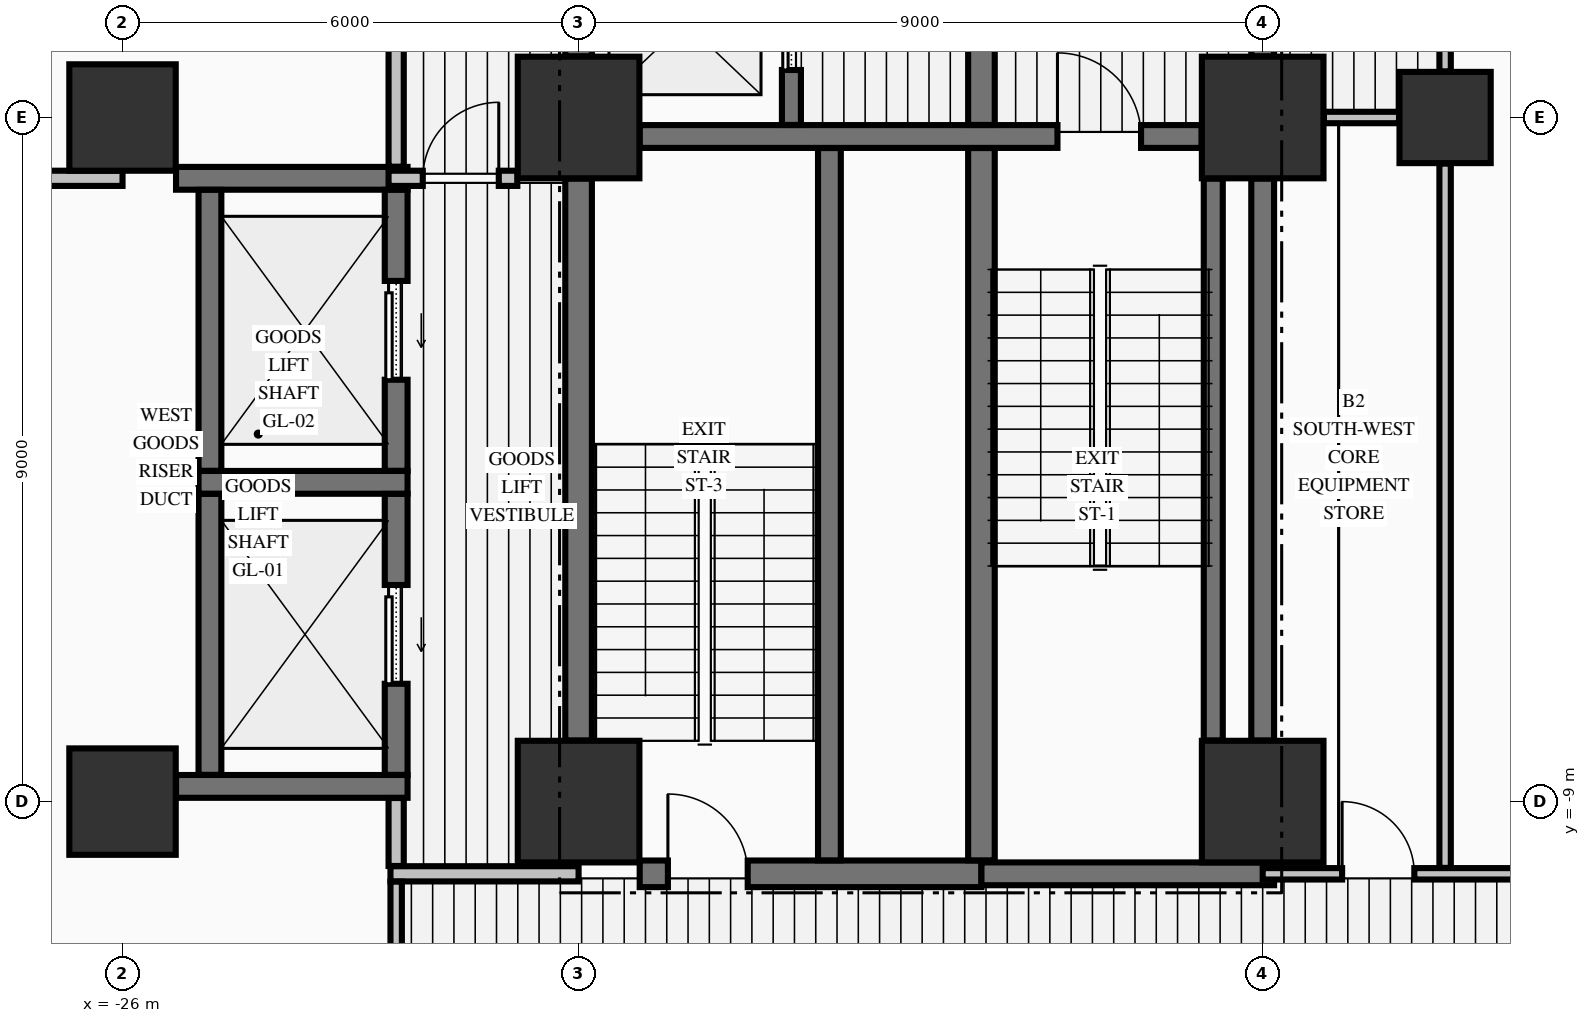
"""IFC4 building model, lengths in metres.
Left out: names, types, materials, properties, quantities, classifications, styles, units other than length and angle.
Written with IfcOpenShell. Run it as: python <this file> out.ifc"""

import sys

from ifc_helpers import new_model, si_unit, direction, frame, frame_2d, origin, origin_2d, place, context, subcontext, project, spatial, rectangle, extrude, element, fill, save


model = new_model("IFC4")
c1 = context("Model", 3, precision=1e-05, world=origin(), true_north=direction((0.0, 1.0)))
c2 = subcontext(c1, "Body", "Model", "MODEL_VIEW")
j1 = project(units=[si_unit("LENGTHUNIT", "METRE"), si_unit("PLANEANGLEUNIT", "RADIAN")], contexts=[c1])
p1 = place(None, origin())
s1 = spatial("IfcSite", under=j1, at=p1, CompositionType="ELEMENT")
p2 = place(p1, origin())
s2 = spatial("IfcBuilding", under=s1, at=p2, CompositionType="ELEMENT")
p3 = place(p2, frame((0.0, 0.0, -9.1)))
s3 = spatial("IfcBuildingStorey", under=s2, at=p3, CompositionType="ELEMENT", Elevation=-9.1)
for number, where, z_axis, x_axis in (
    (1, (-26.0, -9.0, -0.45), (0.0, 0.0, 1.0), (1.0, 0.0, 0.0)),
    (2, (-26.0, 0.0, -0.45), (0.0, 0.0, 1.0), (1.0, 0.0, 0.0)),
):
    element("IfcColumn", number, at=place(p3, frame(where, z_axis=z_axis, x_axis=x_axis)), inside=s3, PredefinedType="COLUMN", context=c2, shape_type="SweptSolid", body=[
        extrude(rectangle(XDim=1.4, YDim=1.4, at=origin_2d()), origin(), (0.0, 0.0, 1.0), 4.65),
    ])
for number, where, z_axis, x_axis in (
    (3, (-20.0, -9.0, -0.45), (0.0, 0.0, 1.0), (1.0, 0.0, 0.0)),
    (4, (-20.0, 0.0, -0.45), (0.0, 0.0, 1.0), (1.0, 0.0, 0.0)),
    (5, (-11.0, -9.0, -0.45), (0.0, 0.0, 1.0), (1.0, 0.0, 0.0)),
    (6, (-11.0, 0.0, -0.45), (0.0, 0.0, 1.0), (1.0, 0.0, 0.0)),
):
    element("IfcColumn", number, at=place(p3, frame(where, z_axis=z_axis, x_axis=x_axis)), inside=s3, PredefinedType="COLUMN", context=c2, shape_type="SweptSolid", body=[
        extrude(rectangle(XDim=1.6, YDim=1.6, at=origin_2d()), origin(), (0.0, 0.0, 1.0), 4.65),
    ])
p4 = place(p3, frame((-8.6, 0.0, -0.45), z_axis=(0.0, 0.0, 1.0), x_axis=(1.0, 0.0, 0.0)))
e7 = element("IfcColumn", 7, at=p4, inside=s3, PredefinedType="COLUMN", context=c2, shape_type="SweptSolid", body=[
    extrude(rectangle(XDim=1.2, YDim=1.2, at=origin_2d()), origin(), (0.0, 0.0, 1.0), 4.65),
])
p5 = place(p3, frame((-19.196, -9.95, 0.0), z_axis=(0.0, 0.0, 1.0), x_axis=(1.0, 0.0, 0.0)))
e8 = element("IfcWall", 8, at=p5, inside=s3, PredefinedType="SHEAR", context=c2, shape_type="SweptSolid", body=[
    extrude(rectangle(XDim=4.496, YDim=0.35, at=frame_2d((2.248, 0.0))), origin(), (0.0, 0.0, 1.0), 4.2),
])
p6 = place(p5, frame((0.371, 0.0, 0.0)))
e9 = element("IfcOpeningElement", 9, at=p6, cuts=e8, PredefinedType="OPENING", context=c2, shape_type="SweptSolid", body=[
    extrude(rectangle(XDim=1.05, YDim=2.15, at=frame_2d((0.525, 1.075))), frame((0.0, 0.185, 0.0), z_axis=(0.0, -1.0, 0.0), x_axis=(1.0, 0.0, 0.0)), (0.0, 0.0, 1.0), 0.37),
])
p7 = place(p3, frame((-14.7, -9.95, 0.0), z_axis=(0.0, 0.0, 1.0), x_axis=(1.0, 0.0, 0.0)))
e10 = element("IfcWall", 10, at=p7, inside=s3, PredefinedType="SHEAR", context=c2, shape_type="SweptSolid", body=[
    extrude(rectangle(XDim=3.85, YDim=0.3, at=frame_2d((1.925, 0.0))), origin(), (0.0, 0.0, 1.0), 4.2),
])
p8 = place(p3, frame((-25.296, -8.8, 0.0), z_axis=(0.0, 0.0, 1.0), x_axis=(1.0, 0.0, 0.0)))
e11 = element("IfcWall", 11, at=p8, inside=s3, PredefinedType="SHEAR", context=c2, shape_type="SweptSolid", body=[
    extrude(rectangle(XDim=3.046, YDim=0.3, at=frame_2d((1.523, 0.0))), origin(), (0.0, 0.0, 1.0), 4.2),
])
p9 = place(p3, frame((-25.0, -4.8, 0.0), z_axis=(0.0, 0.0, 1.0), x_axis=(1.0, 0.0, 0.0)))
e12 = element("IfcWall", 12, at=p9, inside=s3, PredefinedType="SHEAR", context=c2, shape_type="SweptSolid", body=[
    extrude(rectangle(XDim=2.75, YDim=0.3, at=frame_2d((1.375, 0.0))), origin(), (0.0, 0.0, 1.0), 4.2),
])
p10 = place(p3, frame((-25.296, -0.8, 0.0), z_axis=(0.0, 0.0, 1.0), x_axis=(1.0, 0.0, 0.0)))
e13 = element("IfcWall", 13, at=p10, inside=s3, PredefinedType="SHEAR", context=c2, shape_type="SweptSolid", body=[
    extrude(rectangle(XDim=3.046, YDim=0.3, at=frame_2d((1.523, 0.0))), origin(), (0.0, 0.0, 1.0), 4.2),
])
p11 = place(p3, frame((-19.196, -0.25, 0.0), z_axis=(0.0, 0.0, 1.0), x_axis=(1.0, 0.0, 0.0)))
e14 = element("IfcWall", 14, at=p11, inside=s3, PredefinedType="SHEAR", context=c2, shape_type="SweptSolid", body=[
    extrude(rectangle(XDim=7.392, YDim=0.3, at=frame_2d((3.696, 0.0))), origin(), (0.0, 0.0, 1.0), 4.2),
])
p12 = place(p11, frame((5.496, 0.0, 0.0)))
e15 = element("IfcOpeningElement", 15, at=p12, cuts=e14, PredefinedType="OPENING", context=c2, shape_type="SweptSolid", body=[
    extrude(rectangle(XDim=1.1, YDim=2.15, at=frame_2d((0.55, 1.075))), frame((0.0, 0.16, 0.0), z_axis=(0.0, -1.0, 0.0), x_axis=(1.0, 0.0, 0.0)), (0.0, 0.0, 1.0), 0.32),
])
p13 = place(p3, frame((-22.475, -9.95, 0.0), z_axis=(0.0, 0.0, 1.0), x_axis=(1.0, 0.0, 0.0)))
e16 = element("IfcWall", 16, at=p13, inside=s3, PredefinedType="PARTITIONING", context=c2, shape_type="SweptSolid", body=[
    extrude(rectangle(XDim=2.475, YDim=0.2, at=frame_2d((1.238, 0.0))), origin(), (0.0, 0.0, 1.0), 4.2),
])
p14 = place(p3, frame((-11.0, -9.95, 0.0), z_axis=(0.0, 0.0, 1.0), x_axis=(1.0, 0.0, 0.0)))
e17 = element("IfcWall", 17, at=p14, inside=s3, PredefinedType="PARTITIONING", context=c2, shape_type="SweptSolid", body=[
    extrude(rectangle(XDim=22.0, YDim=0.15, at=frame_2d((11.0, 0.0))), origin(), (0.0, 0.0, 1.0), 4.2),
])
p15 = place(p14, frame((1.045, 0.0, 0.0)))
e18 = element("IfcOpeningElement", 18, at=p15, cuts=e17, PredefinedType="OPENING", context=c2, shape_type="SweptSolid", body=[
    extrude(rectangle(XDim=0.95, YDim=2.15, at=frame_2d((0.475, 1.075))), frame((0.0, 0.085, 0.0), z_axis=(0.0, -1.0, 0.0), x_axis=(1.0, 0.0, 0.0)), (0.0, 0.0, 1.0), 0.17),
])
p16 = place(p14, frame((20.005, 0.0, 0.0)))
e19 = element("IfcOpeningElement", 19, at=p16, cuts=e17, PredefinedType="OPENING", context=c2, shape_type="SweptSolid", body=[
    extrude(rectangle(XDim=0.95, YDim=2.15, at=frame_2d((0.475, 1.075))), frame((0.0, 0.085, 0.0), z_axis=(0.0, -1.0, 0.0), x_axis=(1.0, 0.0, 0.0)), (0.0, 0.0, 1.0), 0.17),
])
p17 = place(p3, frame((-33.722, -0.8, 0.0), z_axis=(0.0, 0.0, 1.0), x_axis=(1.0, 0.0, 0.0)))
e20 = element("IfcWall", 20, at=p17, inside=s3, PredefinedType="PARTITIONING", context=c2, shape_type="SweptSolid", body=[
    extrude(rectangle(XDim=7.722, YDim=0.2, at=frame_2d((3.861, 0.0))), origin(), (0.0, 0.0, 1.0), 4.2),
])
p18 = place(p3, frame((-22.5, -0.8, 0.0), z_axis=(0.0, 0.0, 1.0), x_axis=(1.0, 0.0, 0.0)))
e21 = element("IfcWall", 21, at=p18, inside=s3, PredefinedType="PARTITIONING", context=c2, shape_type="SweptSolid", body=[
    extrude(rectangle(XDim=1.694, YDim=0.2, at=frame_2d((0.847, 0.0))), origin(), (0.0, 0.0, 1.0), 4.2),
])
p19 = place(p18, frame((0.45, 0.0, 0.0)))
e22 = element("IfcOpeningElement", 22, at=p19, cuts=e21, PredefinedType="OPENING", context=c2, shape_type="SweptSolid", body=[
    extrude(rectangle(XDim=1.0, YDim=2.15, at=frame_2d((0.5, 1.075))), frame((0.0, 0.11, 0.0), z_axis=(0.0, -1.0, 0.0), x_axis=(1.0, 0.0, 0.0)), (0.0, 0.0, 1.0), 0.22),
])
p20 = place(p3, frame((-10.194, 0.0, 0.0), z_axis=(0.0, 0.0, 1.0), x_axis=(1.0, 0.0, 0.0)))
e23 = element("IfcWall", 23, at=p20, inside=s3, PredefinedType="PARTITIONING", context=c2, shape_type="SweptSolid", body=[
    extrude(rectangle(XDim=0.988, YDim=0.15, at=frame_2d((0.494, 0.0))), origin(), (0.0, 0.0, 1.0), 3.242),
])
for number, where, z_axis, x_axis in (
    (24, (-24.85, -8.648, 0.0), (0.0, 0.0, 1.0), (0.0, 1.0, 0.0)),
    (25, (-24.85, -4.648, 0.0), (0.0, 0.0, 1.0), (0.0, 1.0, 0.0)),
):
    element("IfcWall", number, at=place(p3, frame(where, z_axis=z_axis, x_axis=x_axis)), inside=s3, PredefinedType="SHEAR", context=c2, shape_type="SweptSolid", body=[
        extrude(rectangle(XDim=3.696, YDim=0.3, at=frame_2d((1.848, 0.0))), origin(), (0.0, 0.0, 1.0), 4.2),
    ])
p21 = place(p3, frame((-22.4, -8.648, 0.0), z_axis=(0.0, 0.0, 1.0), x_axis=(0.0, 1.0, 0.0)))
e26 = element("IfcWall", 26, at=p21, inside=s3, PredefinedType="SHEAR", context=c2, shape_type="SweptSolid", body=[
    extrude(rectangle(XDim=3.696, YDim=0.3, at=frame_2d((1.848, 0.0))), origin(), (0.0, 0.0, 1.0), 4.2),
])
p22 = place(p21, frame((1.198, 0.0, 0.0)))
e27 = element("IfcOpeningElement", 27, at=p22, cuts=e26, PredefinedType="OPENING", context=c2, shape_type="SweptSolid", body=[
    extrude(rectangle(XDim=1.3, YDim=2.3, at=frame_2d((0.65, 1.15))), frame((0.0, 0.16, 0.0), z_axis=(0.0, -1.0, 0.0), x_axis=(1.0, 0.0, 0.0)), (0.0, 0.0, 1.0), 0.32),
])
p23 = place(p3, frame((-22.4, -4.648, 0.0), z_axis=(0.0, 0.0, 1.0), x_axis=(0.0, 1.0, 0.0)))
e28 = element("IfcWall", 28, at=p23, inside=s3, PredefinedType="SHEAR", context=c2, shape_type="SweptSolid", body=[
    extrude(rectangle(XDim=3.696, YDim=0.3, at=frame_2d((1.848, 0.0))), origin(), (0.0, 0.0, 1.0), 4.2),
])
p24 = place(p23, frame((1.198, 0.0, 0.0)))
e29 = element("IfcOpeningElement", 29, at=p24, cuts=e28, PredefinedType="OPENING", context=c2, shape_type="SweptSolid", body=[
    extrude(rectangle(XDim=1.3, YDim=2.3, at=frame_2d((0.65, 1.15))), frame((0.0, 0.16, 0.0), z_axis=(0.0, -1.0, 0.0), x_axis=(1.0, 0.0, 0.0)), (0.0, 0.0, 1.0), 0.32),
])
p25 = place(p3, frame((-20.0, -8.196, 0.0), z_axis=(0.0, 0.0, 1.0), x_axis=(0.0, 1.0, 0.0)))
e30 = element("IfcWall", 30, at=p25, inside=s3, PredefinedType="SHEAR", context=c2, shape_type="SweptSolid", body=[
    extrude(rectangle(XDim=7.392, YDim=0.35, at=frame_2d((3.696, 0.0))), origin(), (0.0, 0.0, 1.0), 4.2),
])
p26 = place(p3, frame((-20.0, 0.804, 0.0), z_axis=(0.0, 0.0, 1.0), x_axis=(0.0, 1.0, 0.0)))
e31 = element("IfcWall", 31, at=p26, inside=s3, PredefinedType="SHEAR", context=c2, shape_type="SweptSolid", body=[
    extrude(rectangle(XDim=1.669, YDim=0.35, at=frame_2d((0.834, 0.0))), origin(), (0.0, 0.0, 1.0), 4.2),
])
p27 = place(p3, frame((-17.2, -0.098, 0.0), z_axis=(0.0, 0.0, 1.0), x_axis=(0.0, 1.0, 0.0)))
e32 = element("IfcWall", 32, at=p27, inside=s3, PredefinedType="SOLIDWALL", context=c2, shape_type="SweptSolid", body=[
    extrude(rectangle(XDim=2.571, YDim=0.25, at=frame_2d((1.285, 0.0))), origin(), (0.0, 0.0, 1.0), 4.2),
])
p28 = place(p27, frame((0.723, 0.0, 0.0)))
e33 = element("IfcOpeningElement", 33, at=p28, cuts=e32, PredefinedType="OPENING", context=c2, shape_type="SweptSolid", body=[
    extrude(rectangle(XDim=1.1, YDim=2.2, at=frame_2d((0.55, 1.1))), frame((0.0, 0.135, 0.0), z_axis=(0.0, -1.0, 0.0), x_axis=(1.0, 0.0, 0.0)), (0.0, 0.0, 1.0), 0.27),
])
p29 = place(p3, frame((-16.7, -9.773, 0.0), z_axis=(0.0, 0.0, 1.0), x_axis=(0.0, 1.0, 0.0)))
e34 = element("IfcWall", 34, at=p29, inside=s3, PredefinedType="SHEAR", context=c2, shape_type="SweptSolid", body=[
    extrude(rectangle(XDim=9.371, YDim=0.3, at=frame_2d((4.686, 0.0))), origin(), (0.0, 0.0, 1.0), 4.2),
])
p30 = place(p3, frame((-14.7, -9.773, 0.0), z_axis=(0.0, 0.0, 1.0), x_axis=(0.0, 1.0, 0.0)))
e35 = element("IfcWall", 35, at=p30, inside=s3, PredefinedType="SHEAR", context=c2, shape_type="SweptSolid", body=[
    extrude(rectangle(XDim=9.371, YDim=0.35, at=frame_2d((4.686, 0.0))), origin(), (0.0, 0.0, 1.0), 4.2),
])
p31 = place(p3, frame((-14.7, -0.098, 0.0), z_axis=(0.0, 0.0, 1.0), x_axis=(0.0, 1.0, 0.0)))
e36 = element("IfcWall", 36, at=p31, inside=s3, PredefinedType="SHEAR", context=c2, shape_type="SweptSolid", body=[
    extrude(rectangle(XDim=2.846, YDim=0.35, at=frame_2d((1.423, 0.0))), origin(), (0.0, 0.0, 1.0), 4.2),
])
p32 = place(p3, frame((-11.65, -8.196, 0.0), z_axis=(0.0, 0.0, 1.0), x_axis=(0.0, 1.0, 0.0)))
e37 = element("IfcWall", 37, at=p32, inside=s3, PredefinedType="SOLIDWALL", context=c2, shape_type="SweptSolid", body=[
    extrude(rectangle(XDim=7.392, YDim=0.25, at=frame_2d((3.696, 0.0))), origin(), (0.0, 0.0, 1.0), 4.2),
])
p33 = place(p3, frame((-11.0, -8.196, 0.0), z_axis=(0.0, 0.0, 1.0), x_axis=(0.0, 1.0, 0.0)))
e38 = element("IfcWall", 38, at=p33, inside=s3, PredefinedType="SHEAR", context=c2, shape_type="SweptSolid", body=[
    extrude(rectangle(XDim=7.392, YDim=0.3, at=frame_2d((3.696, 0.0))), origin(), (0.0, 0.0, 1.0), 4.2),
])
p34 = place(p3, frame((-11.0, 0.804, 0.0), z_axis=(0.0, 0.0, 1.0), x_axis=(0.0, 1.0, 0.0)))
e39 = element("IfcWall", 39, at=p34, inside=s3, PredefinedType="SHEAR", context=c2, shape_type="SweptSolid", body=[
    extrude(rectangle(XDim=1.944, YDim=0.3, at=frame_2d((0.972, 0.0))), origin(), (0.0, 0.0, 1.0), 4.2),
])
p35 = place(p34, frame((0.296, 0.0, 0.0)))
e40 = element("IfcOpeningElement", 40, at=p35, cuts=e39, PredefinedType="OPENING", context=c2, shape_type="SweptSolid", body=[
    extrude(rectangle(XDim=1.1, YDim=2.15, at=frame_2d((0.55, 1.075))), frame((0.0, 0.16, 0.0), z_axis=(0.0, -1.0, 0.0), x_axis=(1.0, 0.0, 0.0)), (0.0, 0.0, 1.0), 0.32),
])
p36 = place(p3, frame((-22.4, -12.522, 0.0), z_axis=(0.0, 0.0, 1.0), x_axis=(0.0, 1.0, 0.0)))
e41 = element("IfcWall", 41, at=p36, inside=s3, PredefinedType="PARTITIONING", context=c2, shape_type="SweptSolid", body=[
    extrude(rectangle(XDim=2.469, YDim=0.15, at=frame_2d((1.234, 0.0))), origin(), (0.0, 0.0, 1.0), 4.2),
])
p37 = place(p3, frame((-22.4, -9.847, 0.0), z_axis=(0.0, 0.0, 1.0), x_axis=(0.0, 1.0, 0.0)))
e42 = element("IfcWall", 42, at=p37, inside=s3, PredefinedType="PARTITIONING", context=c2, shape_type="SweptSolid", body=[
    extrude(rectangle(XDim=0.894, YDim=0.2, at=frame_2d((0.447, 0.0))), origin(), (0.0, 0.0, 1.0), 4.2),
])
p38 = place(p3, frame((-22.4, -0.647, 0.0), z_axis=(0.0, 0.0, 1.0), x_axis=(0.0, 1.0, 0.0)))
e43 = element("IfcWall", 43, at=p38, inside=s3, PredefinedType="PARTITIONING", context=c2, shape_type="SweptSolid", body=[
    extrude(rectangle(XDim=11.069, YDim=0.2, at=frame_2d((5.535, 0.0))), origin(), (0.0, 0.0, 1.0), 4.2),
])
p39 = place(p38, frame((4.547, 0.0, 0.0)))
e44 = element("IfcOpeningElement", 44, at=p39, cuts=e43, PredefinedType="OPENING", context=c2, shape_type="SweptSolid", body=[
    extrude(rectangle(XDim=1.2, YDim=2.15, at=frame_2d((0.6, 1.075))), frame((0.0, 0.11, 0.0), z_axis=(0.0, -1.0, 0.0), x_axis=(1.0, 0.0, 0.0)), (0.0, 0.0, 1.0), 0.22),
])
p40 = place(p3, frame((-8.6, -9.872, 0.0), z_axis=(0.0, 0.0, 1.0), x_axis=(0.0, 1.0, 0.0)))
e45 = element("IfcWall", 45, at=p40, inside=s3, PredefinedType="PARTITIONING", context=c2, shape_type="SweptSolid", body=[
    extrude(rectangle(XDim=9.266, YDim=0.15, at=frame_2d((4.633, 0.0))), origin(), (0.0, 0.0, 1.0), 4.2),
])
p41 = place(p3, frame((-8.6, 0.606, 0.0), z_axis=(0.0, 0.0, 1.0), x_axis=(0.0, 1.0, 0.0)))
e46 = element("IfcWall", 46, at=p41, inside=s3, PredefinedType="PARTITIONING", context=c2, shape_type="SweptSolid", body=[
    extrude(rectangle(XDim=9.816, YDim=0.15, at=frame_2d((4.908, 0.0))), origin(), (0.0, 0.0, 1.0), 3.242),
])
p42 = place(p41, frame((3.344, 0.0, 0.0)))
e47 = element("IfcOpeningElement", 47, at=p42, cuts=e46, PredefinedType="OPENING", context=c2, shape_type="SweptSolid", body=[
    extrude(rectangle(XDim=1.1, YDim=2.15, at=frame_2d((0.55, 1.075))), frame((0.0, 0.085, 0.0), z_axis=(0.0, -1.0, 0.0), x_axis=(1.0, 0.0, 0.0)), (0.0, 0.0, 1.0), 0.17),
])
p43 = place(p12, origin())
e48 = element("IfcDoor", 48, at=p43, inside=s3, OperationType="SINGLE_SWING_LEFT", PredefinedType="DOOR", context=c2, shape_type="SweptSolid", body=[
    extrude(rectangle(XDim=1.1, YDim=2.15, at=frame_2d((0.55, 1.075))), frame((0.0, 0.025, 0.0), z_axis=(0.0, -1.0, 0.0), x_axis=(1.0, 0.0, 0.0)), (0.0, 0.0, 1.0), 0.05),
])
fill(e15, e48)
p44 = place(p6, origin())
e49 = element("IfcDoor", 49, at=p44, inside=s3, OperationType="SINGLE_SWING_LEFT", PredefinedType="DOOR", context=c2, shape_type="SweptSolid", body=[
    extrude(rectangle(XDim=1.05, YDim=2.15, at=frame_2d((0.525, 1.075))), frame((0.0, 0.025, 0.0), z_axis=(0.0, -1.0, 0.0), x_axis=(1.0, 0.0, 0.0)), (0.0, 0.0, 1.0), 0.05),
])
fill(e9, e49)
p45 = place(p28, origin())
e50 = element("IfcDoor", 50, at=p45, inside=s3, OperationType="SLIDING_TO_LEFT", PredefinedType="DOOR", context=c2, shape_type="SweptSolid", body=[
    extrude(rectangle(XDim=1.1, YDim=2.2, at=frame_2d((0.55, 1.1))), frame((0.0, 0.025, 0.0), z_axis=(0.0, -1.0, 0.0), x_axis=(1.0, 0.0, 0.0)), (0.0, 0.0, 1.0), 0.05),
])
fill(e33, e50)
p46 = place(p22, origin())
e51 = element("IfcDoor", 51, at=p46, inside=s3, OperationType="SLIDING_TO_LEFT", PredefinedType="DOOR", context=c2, shape_type="SweptSolid", body=[
    extrude(rectangle(XDim=1.3, YDim=2.3, at=frame_2d((0.65, 1.15))), frame((0.0, 0.025, 0.0), z_axis=(0.0, -1.0, 0.0), x_axis=(1.0, 0.0, 0.0)), (0.0, 0.0, 1.0), 0.05),
])
fill(e27, e51)
p47 = place(p24, origin())
e52 = element("IfcDoor", 52, at=p47, inside=s3, OperationType="SLIDING_TO_LEFT", PredefinedType="DOOR", context=c2, shape_type="SweptSolid", body=[
    extrude(rectangle(XDim=1.3, YDim=2.3, at=frame_2d((0.65, 1.15))), frame((0.0, 0.025, 0.0), z_axis=(0.0, -1.0, 0.0), x_axis=(1.0, 0.0, 0.0)), (0.0, 0.0, 1.0), 0.05),
])
fill(e29, e52)
p48 = place(p19, origin())
e53 = element("IfcDoor", 53, at=p48, inside=s3, OperationType="SINGLE_SWING_RIGHT", PredefinedType="DOOR", context=c2, shape_type="SweptSolid", body=[
    extrude(rectangle(XDim=1.0, YDim=2.15, at=frame_2d((0.5, 1.075))), frame((0.0, 0.025, 0.0), z_axis=(0.0, -1.0, 0.0), x_axis=(1.0, 0.0, 0.0)), (0.0, 0.0, 1.0), 0.05),
])
fill(e22, e53)
p49 = place(p15, origin())
e54 = element("IfcDoor", 54, at=p49, inside=s3, OperationType="SINGLE_SWING_LEFT", PredefinedType="DOOR", context=c2, shape_type="SweptSolid", body=[
    extrude(rectangle(XDim=0.95, YDim=2.15, at=frame_2d((0.475, 1.075))), frame((0.0, 0.025, 0.0), z_axis=(0.0, -1.0, 0.0), x_axis=(1.0, 0.0, 0.0)), (0.0, 0.0, 1.0), 0.05),
])
fill(e18, e54)
save(model, sys.argv[1])
